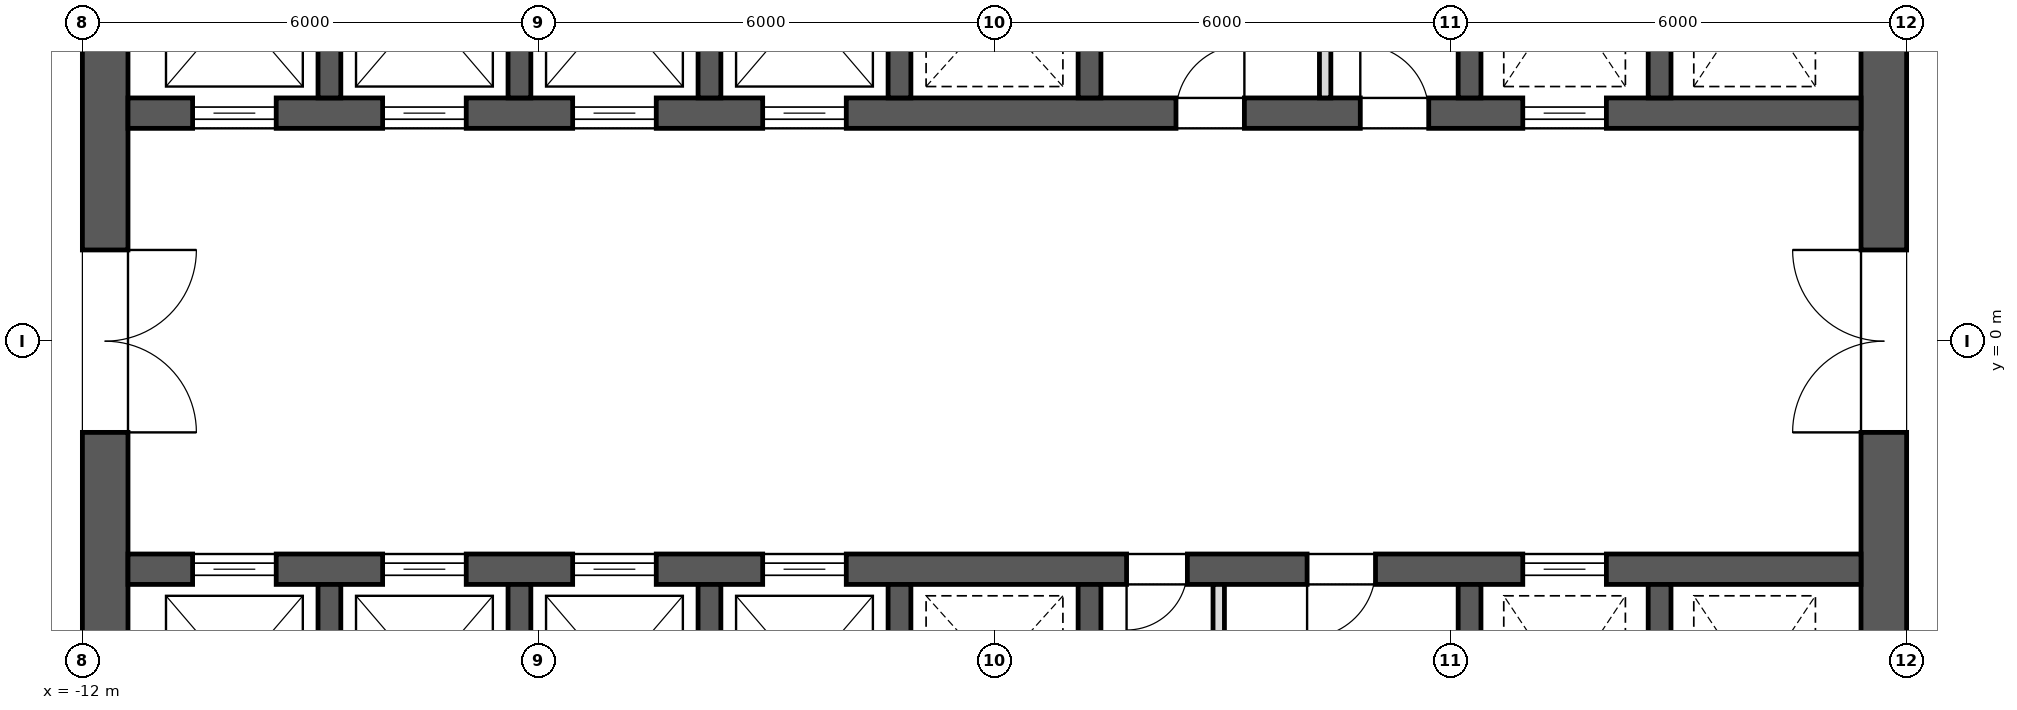
"""IFC4 building model, lengths in metres.
Left out: names, types, materials, properties, quantities, classifications, styles, units other than length and angle.
Written with IfcOpenShell. Run it as: python <this file> out.ifc"""

import sys

from ifc_helpers import new_model, si_unit, direction, frame, frame_2d, origin, place, context, subcontext, project, spatial, rectangle, extrude, element, fill, save


model = new_model("IFC4")
c1 = context("Model", 3, precision=1e-05, world=origin(), true_north=direction((0.0, 1.0)))
c2 = subcontext(c1, "Body", "Model", "MODEL_VIEW")
j1 = project(units=[si_unit("LENGTHUNIT", "METRE"), si_unit("PLANEANGLEUNIT", "RADIAN")], contexts=[c1])
p1 = place(None, origin())
s1 = spatial("IfcSite", under=j1, at=p1, CompositionType="ELEMENT")
p2 = place(p1, origin())
s2 = spatial("IfcBuilding", under=s1, at=p2, CompositionType="ELEMENT")
p3 = place(p2, frame((0.0, 0.0, 214.9)))
s3 = spatial("IfcBuildingStorey", under=s2, at=p3, CompositionType="ELEMENT", Elevation=214.9)
p4 = place(p3, frame((11.7, -11.4, 0.0), z_axis=(0.0, 0.0, 1.0), x_axis=(0.0, 1.0, 0.0)))
e1 = element("IfcWall", 1, at=p4, inside=s3, PredefinedType="SHEAR", context=c2, shape_type="SweptSolid", body=[
    extrude(rectangle(XDim=22.8, YDim=0.6, at=frame_2d((11.4, 0.0))), origin(), (0.0, 0.0, 1.0), 4.0),
])
p5 = place(p4, frame((10.2, 0.0, 0.0)))
e2 = element("IfcOpeningElement", 2, at=p5, cuts=e1, PredefinedType="OPENING", context=c2, shape_type="SweptSolid", body=[
    extrude(rectangle(XDim=2.4, YDim=2.1, at=frame_2d((1.2, 1.05))), frame((0.0, 0.312, 0.0), z_axis=(0.0, -1.0, 0.0), x_axis=(1.0, 0.0, 0.0)), (0.0, 0.0, 1.0), 0.624),
])
p6 = place(p4, frame((19.5, 0.0, 0.0)))
e3 = element("IfcOpeningElement", 3, at=p6, cuts=e1, PredefinedType="OPENING", context=c2, shape_type="SweptSolid", body=[
    extrude(rectangle(XDim=1.2, YDim=2.1, at=frame_2d((0.6, 1.05))), frame((0.0, 0.312, 0.0), z_axis=(0.0, -1.0, 0.0), x_axis=(1.0, 0.0, 0.0)), (0.0, 0.0, 1.0), 0.624),
])
p7 = place(p4, frame((2.1, 0.0, 0.0)))
e4 = element("IfcOpeningElement", 4, at=p7, cuts=e1, PredefinedType="OPENING", context=c2, shape_type="SweptSolid", body=[
    extrude(rectangle(XDim=1.2, YDim=2.1, at=frame_2d((0.6, 1.05))), frame((0.0, 0.312, 0.0), z_axis=(0.0, -1.0, 0.0), x_axis=(1.0, 0.0, 0.0)), (0.0, 0.0, 1.0), 0.624),
])
p8 = place(p3, frame((-11.7, -11.4, 0.0), z_axis=(0.0, 0.0, 1.0), x_axis=(0.0, 1.0, 0.0)))
e5 = element("IfcWall", 5, at=p8, inside=s3, PredefinedType="SHEAR", context=c2, shape_type="SweptSolid", body=[
    extrude(rectangle(XDim=22.8, YDim=0.6, at=frame_2d((11.4, 0.0))), origin(), (0.0, 0.0, 1.0), 4.0),
])
p9 = place(p8, frame((10.2, 0.0, 0.0)))
e6 = element("IfcOpeningElement", 6, at=p9, cuts=e5, PredefinedType="OPENING", context=c2, shape_type="SweptSolid", body=[
    extrude(rectangle(XDim=2.4, YDim=2.1, at=frame_2d((1.2, 1.05))), frame((0.0, 0.312, 0.0), z_axis=(0.0, -1.0, 0.0), x_axis=(1.0, 0.0, 0.0)), (0.0, 0.0, 1.0), 0.624),
])
p10 = place(p8, frame((18.925, 0.0, 0.0)))
e7 = element("IfcOpeningElement", 7, at=p10, cuts=e5, PredefinedType="OPENING", context=c2, shape_type="SweptSolid", body=[
    extrude(rectangle(XDim=1.2, YDim=2.1, at=frame_2d((0.6, 1.05))), frame((0.0, 0.312, 0.0), z_axis=(0.0, -1.0, 0.0), x_axis=(1.0, 0.0, 0.0)), (0.0, 0.0, 1.0), 0.624),
])
p11 = place(p8, frame((2.675, 0.0, 0.0)))
e8 = element("IfcOpeningElement", 8, at=p11, cuts=e5, PredefinedType="OPENING", context=c2, shape_type="SweptSolid", body=[
    extrude(rectangle(XDim=1.2, YDim=2.1, at=frame_2d((0.6, 1.05))), frame((0.0, 0.312, 0.0), z_axis=(0.0, -1.0, 0.0), x_axis=(1.0, 0.0, 0.0)), (0.0, 0.0, 1.0), 0.624),
])
p12 = place(p3, frame((-11.4, 3.0, 0.0), z_axis=(0.0, 0.0, 1.0), x_axis=(1.0, 0.0, 0.0)))
e9 = element("IfcWall", 9, at=p12, inside=s3, PredefinedType="SHEAR", context=c2, shape_type="SweptSolid", body=[
    extrude(rectangle(XDim=22.8, YDim=0.4, at=frame_2d((11.4, 0.0))), origin(), (0.0, 0.0, 1.0), 4.0),
])
p13 = place(p12, frame((0.85, 0.0, 0.0)))
e10 = element("IfcOpeningElement", 10, at=p13, cuts=e9, PredefinedType="OPENING", context=c2, shape_type="SweptSolid", body=[
    extrude(rectangle(XDim=1.1, YDim=2.1, at=frame_2d((0.55, 1.05))), frame((0.0, 0.212, 0.0), z_axis=(0.0, -1.0, 0.0), x_axis=(1.0, 0.0, 0.0)), (0.0, 0.0, 1.0), 0.424),
])
p14 = place(p12, frame((3.35, 0.0, 0.0)))
e11 = element("IfcOpeningElement", 11, at=p14, cuts=e9, PredefinedType="OPENING", context=c2, shape_type="SweptSolid", body=[
    extrude(rectangle(XDim=1.1, YDim=2.1, at=frame_2d((0.55, 1.05))), frame((0.0, 0.212, 0.0), z_axis=(0.0, -1.0, 0.0), x_axis=(1.0, 0.0, 0.0)), (0.0, 0.0, 1.0), 0.424),
])
p15 = place(p12, frame((5.85, 0.0, 0.0)))
e12 = element("IfcOpeningElement", 12, at=p15, cuts=e9, PredefinedType="OPENING", context=c2, shape_type="SweptSolid", body=[
    extrude(rectangle(XDim=1.1, YDim=2.1, at=frame_2d((0.55, 1.05))), frame((0.0, 0.212, 0.0), z_axis=(0.0, -1.0, 0.0), x_axis=(1.0, 0.0, 0.0)), (0.0, 0.0, 1.0), 0.424),
])
p16 = place(p12, frame((8.35, 0.0, 0.0)))
e13 = element("IfcOpeningElement", 13, at=p16, cuts=e9, PredefinedType="OPENING", context=c2, shape_type="SweptSolid", body=[
    extrude(rectangle(XDim=1.1, YDim=2.1, at=frame_2d((0.55, 1.05))), frame((0.0, 0.212, 0.0), z_axis=(0.0, -1.0, 0.0), x_axis=(1.0, 0.0, 0.0)), (0.0, 0.0, 1.0), 0.424),
])
p17 = place(p12, frame((18.35, 0.0, 0.0)))
e14 = element("IfcOpeningElement", 14, at=p17, cuts=e9, PredefinedType="OPENING", context=c2, shape_type="SweptSolid", body=[
    extrude(rectangle(XDim=1.1, YDim=2.1, at=frame_2d((0.55, 1.05))), frame((0.0, 0.212, 0.0), z_axis=(0.0, -1.0, 0.0), x_axis=(1.0, 0.0, 0.0)), (0.0, 0.0, 1.0), 0.424),
])
p18 = place(p12, frame((13.788, 0.0, 0.0)))
e15 = element("IfcOpeningElement", 15, at=p18, cuts=e9, PredefinedType="OPENING", context=c2, shape_type="SweptSolid", body=[
    extrude(rectangle(XDim=0.9, YDim=2.1, at=frame_2d((0.45, 1.05))), frame((0.0, 0.212, 0.0), z_axis=(0.0, -1.0, 0.0), x_axis=(1.0, 0.0, 0.0)), (0.0, 0.0, 1.0), 0.424),
])
p19 = place(p12, frame((16.212, 0.0, 0.0)))
e16 = element("IfcOpeningElement", 16, at=p19, cuts=e9, PredefinedType="OPENING", context=c2, shape_type="SweptSolid", body=[
    extrude(rectangle(XDim=0.9, YDim=2.1, at=frame_2d((0.45, 1.05))), frame((0.0, 0.212, 0.0), z_axis=(0.0, -1.0, 0.0), x_axis=(1.0, 0.0, 0.0)), (0.0, 0.0, 1.0), 0.424),
])
for number, where, z_axis, x_axis in (
    (17, (-8.75, 3.2, 0.0), (0.0, 0.0, 1.0), (0.0, 1.0, 0.0)),
    (18, (-6.25, 3.2, 0.0), (0.0, 0.0, 1.0), (0.0, 1.0, 0.0)),
    (19, (-3.75, 3.2, 0.0), (0.0, 0.0, 1.0), (0.0, 1.0, 0.0)),
    (20, (-1.25, 3.2, 0.0), (0.0, 0.0, 1.0), (0.0, 1.0, 0.0)),
    (21, (1.25, 3.2, 0.0), (0.0, 0.0, 1.0), (0.0, 1.0, 0.0)),
    (22, (6.25, 3.2, 0.0), (0.0, 0.0, 1.0), (0.0, 1.0, 0.0)),
    (23, (8.75, 3.2, 0.0), (0.0, 0.0, 1.0), (0.0, 1.0, 0.0)),
):
    element("IfcWall", number, at=place(p3, frame(where, z_axis=z_axis, x_axis=x_axis)), inside=s3, PredefinedType="SHEAR", context=c2, shape_type="SweptSolid", body=[
        extrude(rectangle(XDim=2.9, YDim=0.3, at=frame_2d((1.45, 0.0))), origin(), (0.0, 0.0, 1.0), 4.0),
    ])
p20 = place(p3, frame((-11.4, -3.0, 0.0), z_axis=(0.0, 0.0, 1.0), x_axis=(1.0, 0.0, 0.0)))
e24 = element("IfcWall", 24, at=p20, inside=s3, PredefinedType="SHEAR", context=c2, shape_type="SweptSolid", body=[
    extrude(rectangle(XDim=22.8, YDim=0.4, at=frame_2d((11.4, 0.0))), origin(), (0.0, 0.0, 1.0), 4.0),
])
p21 = place(p20, frame((0.85, 0.0, 0.0)))
e25 = element("IfcOpeningElement", 25, at=p21, cuts=e24, PredefinedType="OPENING", context=c2, shape_type="SweptSolid", body=[
    extrude(rectangle(XDim=1.1, YDim=2.1, at=frame_2d((0.55, 1.05))), frame((0.0, 0.212, 0.0), z_axis=(0.0, -1.0, 0.0), x_axis=(1.0, 0.0, 0.0)), (0.0, 0.0, 1.0), 0.424),
])
p22 = place(p20, frame((3.35, 0.0, 0.0)))
e26 = element("IfcOpeningElement", 26, at=p22, cuts=e24, PredefinedType="OPENING", context=c2, shape_type="SweptSolid", body=[
    extrude(rectangle(XDim=1.1, YDim=2.1, at=frame_2d((0.55, 1.05))), frame((0.0, 0.212, 0.0), z_axis=(0.0, -1.0, 0.0), x_axis=(1.0, 0.0, 0.0)), (0.0, 0.0, 1.0), 0.424),
])
p23 = place(p20, frame((5.85, 0.0, 0.0)))
e27 = element("IfcOpeningElement", 27, at=p23, cuts=e24, PredefinedType="OPENING", context=c2, shape_type="SweptSolid", body=[
    extrude(rectangle(XDim=1.1, YDim=2.1, at=frame_2d((0.55, 1.05))), frame((0.0, 0.212, 0.0), z_axis=(0.0, -1.0, 0.0), x_axis=(1.0, 0.0, 0.0)), (0.0, 0.0, 1.0), 0.424),
])
p24 = place(p20, frame((8.35, 0.0, 0.0)))
e28 = element("IfcOpeningElement", 28, at=p24, cuts=e24, PredefinedType="OPENING", context=c2, shape_type="SweptSolid", body=[
    extrude(rectangle(XDim=1.1, YDim=2.1, at=frame_2d((0.55, 1.05))), frame((0.0, 0.212, 0.0), z_axis=(0.0, -1.0, 0.0), x_axis=(1.0, 0.0, 0.0)), (0.0, 0.0, 1.0), 0.424),
])
p25 = place(p20, frame((18.35, 0.0, 0.0)))
e29 = element("IfcOpeningElement", 29, at=p25, cuts=e24, PredefinedType="OPENING", context=c2, shape_type="SweptSolid", body=[
    extrude(rectangle(XDim=1.1, YDim=2.1, at=frame_2d((0.55, 1.05))), frame((0.0, 0.212, 0.0), z_axis=(0.0, -1.0, 0.0), x_axis=(1.0, 0.0, 0.0)), (0.0, 0.0, 1.0), 0.424),
])
p26 = place(p20, frame((13.137, 0.0, 0.0)))
e30 = element("IfcOpeningElement", 30, at=p26, cuts=e24, PredefinedType="OPENING", context=c2, shape_type="SweptSolid", body=[
    extrude(rectangle(XDim=0.8, YDim=2.1, at=frame_2d((0.4, 1.05))), frame((0.0, 0.212, 0.0), z_axis=(0.0, -1.0, 0.0), x_axis=(1.0, 0.0, 0.0)), (0.0, 0.0, 1.0), 0.424),
])
p27 = place(p20, frame((15.512, 0.0, 0.0)))
e31 = element("IfcOpeningElement", 31, at=p27, cuts=e24, PredefinedType="OPENING", context=c2, shape_type="SweptSolid", body=[
    extrude(rectangle(XDim=0.9, YDim=2.1, at=frame_2d((0.45, 1.05))), frame((0.0, 0.212, 0.0), z_axis=(0.0, -1.0, 0.0), x_axis=(1.0, 0.0, 0.0)), (0.0, 0.0, 1.0), 0.424),
])
for number, where, z_axis, x_axis in (
    (32, (-8.75, -6.1, 0.0), (0.0, 0.0, 1.0), (0.0, 1.0, 0.0)),
    (33, (-6.25, -6.1, 0.0), (0.0, 0.0, 1.0), (0.0, 1.0, 0.0)),
    (34, (-3.75, -6.1, 0.0), (0.0, 0.0, 1.0), (0.0, 1.0, 0.0)),
    (35, (-1.25, -6.1, 0.0), (0.0, 0.0, 1.0), (0.0, 1.0, 0.0)),
    (36, (1.25, -6.1, 0.0), (0.0, 0.0, 1.0), (0.0, 1.0, 0.0)),
    (37, (6.25, -6.1, 0.0), (0.0, 0.0, 1.0), (0.0, 1.0, 0.0)),
    (38, (8.75, -6.1, 0.0), (0.0, 0.0, 1.0), (0.0, 1.0, 0.0)),
):
    element("IfcWall", number, at=place(p3, frame(where, z_axis=z_axis, x_axis=x_axis)), inside=s3, PredefinedType="SHEAR", context=c2, shape_type="SweptSolid", body=[
        extrude(rectangle(XDim=2.9, YDim=0.3, at=frame_2d((1.45, 0.0))), origin(), (0.0, 0.0, 1.0), 4.0),
    ])
for number, where, z_axis, x_axis in (
    (39, (4.35, 3.2, 0.0), (0.0, 0.0, 1.0), (0.0, 1.0, 0.0)),
    (40, (2.95, -6.1, 0.0), (0.0, 0.0, 1.0), (0.0, 1.0, 0.0)),
):
    element("IfcWall", number, at=place(p3, frame(where, z_axis=z_axis, x_axis=x_axis)), inside=s3, PredefinedType="PARTITIONING", context=c2, shape_type="SweptSolid", body=[
        extrude(rectangle(XDim=2.9, YDim=0.15, at=frame_2d((1.45, 0.0))), origin(), (0.0, 0.0, 1.0), 3.7),
    ])
p28 = place(p13, origin())
e41 = element("IfcDoor", 41, at=p28, inside=s3, OperationType="SLIDING_TO_LEFT", PredefinedType="DOOR", context=c2, shape_type="SweptSolid", body=[
    extrude(rectangle(XDim=1.1, YDim=2.1, at=frame_2d((0.55, 1.05))), frame((0.0, 0.025, 0.0), z_axis=(0.0, -1.0, 0.0), x_axis=(1.0, 0.0, 0.0)), (0.0, 0.0, 1.0), 0.05),
])
fill(e10, e41)
p29 = place(p14, origin())
e42 = element("IfcDoor", 42, at=p29, inside=s3, OperationType="SLIDING_TO_LEFT", PredefinedType="DOOR", context=c2, shape_type="SweptSolid", body=[
    extrude(rectangle(XDim=1.1, YDim=2.1, at=frame_2d((0.55, 1.05))), frame((0.0, 0.025, 0.0), z_axis=(0.0, -1.0, 0.0), x_axis=(1.0, 0.0, 0.0)), (0.0, 0.0, 1.0), 0.05),
])
fill(e11, e42)
p30 = place(p21, origin())
e43 = element("IfcDoor", 43, at=p30, inside=s3, OperationType="SLIDING_TO_LEFT", PredefinedType="DOOR", context=c2, shape_type="SweptSolid", body=[
    extrude(rectangle(XDim=1.1, YDim=2.1, at=frame_2d((0.55, 1.05))), frame((0.0, 0.025, 0.0), z_axis=(0.0, -1.0, 0.0), x_axis=(1.0, 0.0, 0.0)), (0.0, 0.0, 1.0), 0.05),
])
fill(e25, e43)
p31 = place(p22, origin())
e44 = element("IfcDoor", 44, at=p31, inside=s3, OperationType="SLIDING_TO_LEFT", PredefinedType="DOOR", context=c2, shape_type="SweptSolid", body=[
    extrude(rectangle(XDim=1.1, YDim=2.1, at=frame_2d((0.55, 1.05))), frame((0.0, 0.025, 0.0), z_axis=(0.0, -1.0, 0.0), x_axis=(1.0, 0.0, 0.0)), (0.0, 0.0, 1.0), 0.05),
])
fill(e26, e44)
p32 = place(p15, origin())
e45 = element("IfcDoor", 45, at=p32, inside=s3, OperationType="SLIDING_TO_LEFT", PredefinedType="DOOR", context=c2, shape_type="SweptSolid", body=[
    extrude(rectangle(XDim=1.1, YDim=2.1, at=frame_2d((0.55, 1.05))), frame((0.0, 0.025, 0.0), z_axis=(0.0, -1.0, 0.0), x_axis=(1.0, 0.0, 0.0)), (0.0, 0.0, 1.0), 0.05),
])
fill(e12, e45)
p33 = place(p16, origin())
e46 = element("IfcDoor", 46, at=p33, inside=s3, OperationType="SLIDING_TO_LEFT", PredefinedType="DOOR", context=c2, shape_type="SweptSolid", body=[
    extrude(rectangle(XDim=1.1, YDim=2.1, at=frame_2d((0.55, 1.05))), frame((0.0, 0.025, 0.0), z_axis=(0.0, -1.0, 0.0), x_axis=(1.0, 0.0, 0.0)), (0.0, 0.0, 1.0), 0.05),
])
fill(e13, e46)
p34 = place(p23, origin())
e47 = element("IfcDoor", 47, at=p34, inside=s3, OperationType="SLIDING_TO_LEFT", PredefinedType="DOOR", context=c2, shape_type="SweptSolid", body=[
    extrude(rectangle(XDim=1.1, YDim=2.1, at=frame_2d((0.55, 1.05))), frame((0.0, 0.025, 0.0), z_axis=(0.0, -1.0, 0.0), x_axis=(1.0, 0.0, 0.0)), (0.0, 0.0, 1.0), 0.05),
])
fill(e27, e47)
p35 = place(p24, origin())
e48 = element("IfcDoor", 48, at=p35, inside=s3, OperationType="SLIDING_TO_LEFT", PredefinedType="DOOR", context=c2, shape_type="SweptSolid", body=[
    extrude(rectangle(XDim=1.1, YDim=2.1, at=frame_2d((0.55, 1.05))), frame((0.0, 0.025, 0.0), z_axis=(0.0, -1.0, 0.0), x_axis=(1.0, 0.0, 0.0)), (0.0, 0.0, 1.0), 0.05),
])
fill(e28, e48)
p36 = place(p17, origin())
e49 = element("IfcDoor", 49, at=p36, inside=s3, OperationType="SLIDING_TO_LEFT", PredefinedType="DOOR", context=c2, shape_type="SweptSolid", body=[
    extrude(rectangle(XDim=1.1, YDim=2.1, at=frame_2d((0.55, 1.05))), frame((0.0, 0.025, 0.0), z_axis=(0.0, -1.0, 0.0), x_axis=(1.0, 0.0, 0.0)), (0.0, 0.0, 1.0), 0.05),
])
fill(e14, e49)
p37 = place(p25, origin())
e50 = element("IfcDoor", 50, at=p37, inside=s3, OperationType="SLIDING_TO_LEFT", PredefinedType="DOOR", context=c2, shape_type="SweptSolid", body=[
    extrude(rectangle(XDim=1.1, YDim=2.1, at=frame_2d((0.55, 1.05))), frame((0.0, 0.025, 0.0), z_axis=(0.0, -1.0, 0.0), x_axis=(1.0, 0.0, 0.0)), (0.0, 0.0, 1.0), 0.05),
])
fill(e29, e50)
p38 = place(p9, frame((2.4, 0.0, 0.0), z_axis=(0.0, 0.0, 1.0), x_axis=(-1.0, 0.0, 0.0)))
e51 = element("IfcDoor", 51, at=p38, inside=s3, OperationType="DOUBLE_DOOR_SINGLE_SWING", PredefinedType="DOOR", context=c2, shape_type="SweptSolid", body=[
    extrude(rectangle(XDim=2.4, YDim=2.1, at=frame_2d((1.2, 1.05))), frame((0.0, 0.025, 0.0), z_axis=(0.0, -1.0, 0.0), x_axis=(1.0, 0.0, 0.0)), (0.0, 0.0, 1.0), 0.05),
])
fill(e6, e51)
p39 = place(p5, origin())
e52 = element("IfcDoor", 52, at=p39, inside=s3, OperationType="DOUBLE_DOOR_SINGLE_SWING", PredefinedType="DOOR", context=c2, shape_type="SweptSolid", body=[
    extrude(rectangle(XDim=2.4, YDim=2.1, at=frame_2d((1.2, 1.05))), frame((0.0, 0.025, 0.0), z_axis=(0.0, -1.0, 0.0), x_axis=(1.0, 0.0, 0.0)), (0.0, 0.0, 1.0), 0.05),
])
fill(e2, e52)
p40 = place(p18, origin())
e53 = element("IfcDoor", 53, at=p40, inside=s3, OperationType="SINGLE_SWING_LEFT", PredefinedType="DOOR", context=c2, shape_type="SweptSolid", body=[
    extrude(rectangle(XDim=0.9, YDim=2.1, at=frame_2d((0.45, 1.05))), frame((0.0, 0.025, 0.0), z_axis=(0.0, -1.0, 0.0), x_axis=(1.0, 0.0, 0.0)), (0.0, 0.0, 1.0), 0.05),
])
fill(e15, e53)
p41 = place(p19, origin())
e54 = element("IfcDoor", 54, at=p41, inside=s3, OperationType="SINGLE_SWING_RIGHT", PredefinedType="DOOR", context=c2, shape_type="SweptSolid", body=[
    extrude(rectangle(XDim=0.9, YDim=2.1, at=frame_2d((0.45, 1.05))), frame((0.0, 0.025, 0.0), z_axis=(0.0, -1.0, 0.0), x_axis=(1.0, 0.0, 0.0)), (0.0, 0.0, 1.0), 0.05),
])
fill(e16, e54)
p42 = place(p26, frame((0.8, 0.0, 0.0), z_axis=(0.0, 0.0, 1.0), x_axis=(-1.0, 0.0, 0.0)))
e55 = element("IfcDoor", 55, at=p42, inside=s3, OperationType="SINGLE_SWING_LEFT", PredefinedType="DOOR", context=c2, shape_type="SweptSolid", body=[
    extrude(rectangle(XDim=0.8, YDim=2.1, at=frame_2d((0.4, 1.05))), frame((0.0, 0.025, 0.0), z_axis=(0.0, -1.0, 0.0), x_axis=(1.0, 0.0, 0.0)), (0.0, 0.0, 1.0), 0.05),
])
fill(e30, e55)
p43 = place(p27, frame((0.9, 0.0, 0.0), z_axis=(0.0, 0.0, 1.0), x_axis=(-1.0, 0.0, 0.0)))
e56 = element("IfcDoor", 56, at=p43, inside=s3, OperationType="SINGLE_SWING_LEFT", PredefinedType="DOOR", context=c2, shape_type="SweptSolid", body=[
    extrude(rectangle(XDim=0.9, YDim=2.1, at=frame_2d((0.45, 1.05))), frame((0.0, 0.025, 0.0), z_axis=(0.0, -1.0, 0.0), x_axis=(1.0, 0.0, 0.0)), (0.0, 0.0, 1.0), 0.05),
])
fill(e31, e56)
save(model, sys.argv[1])
